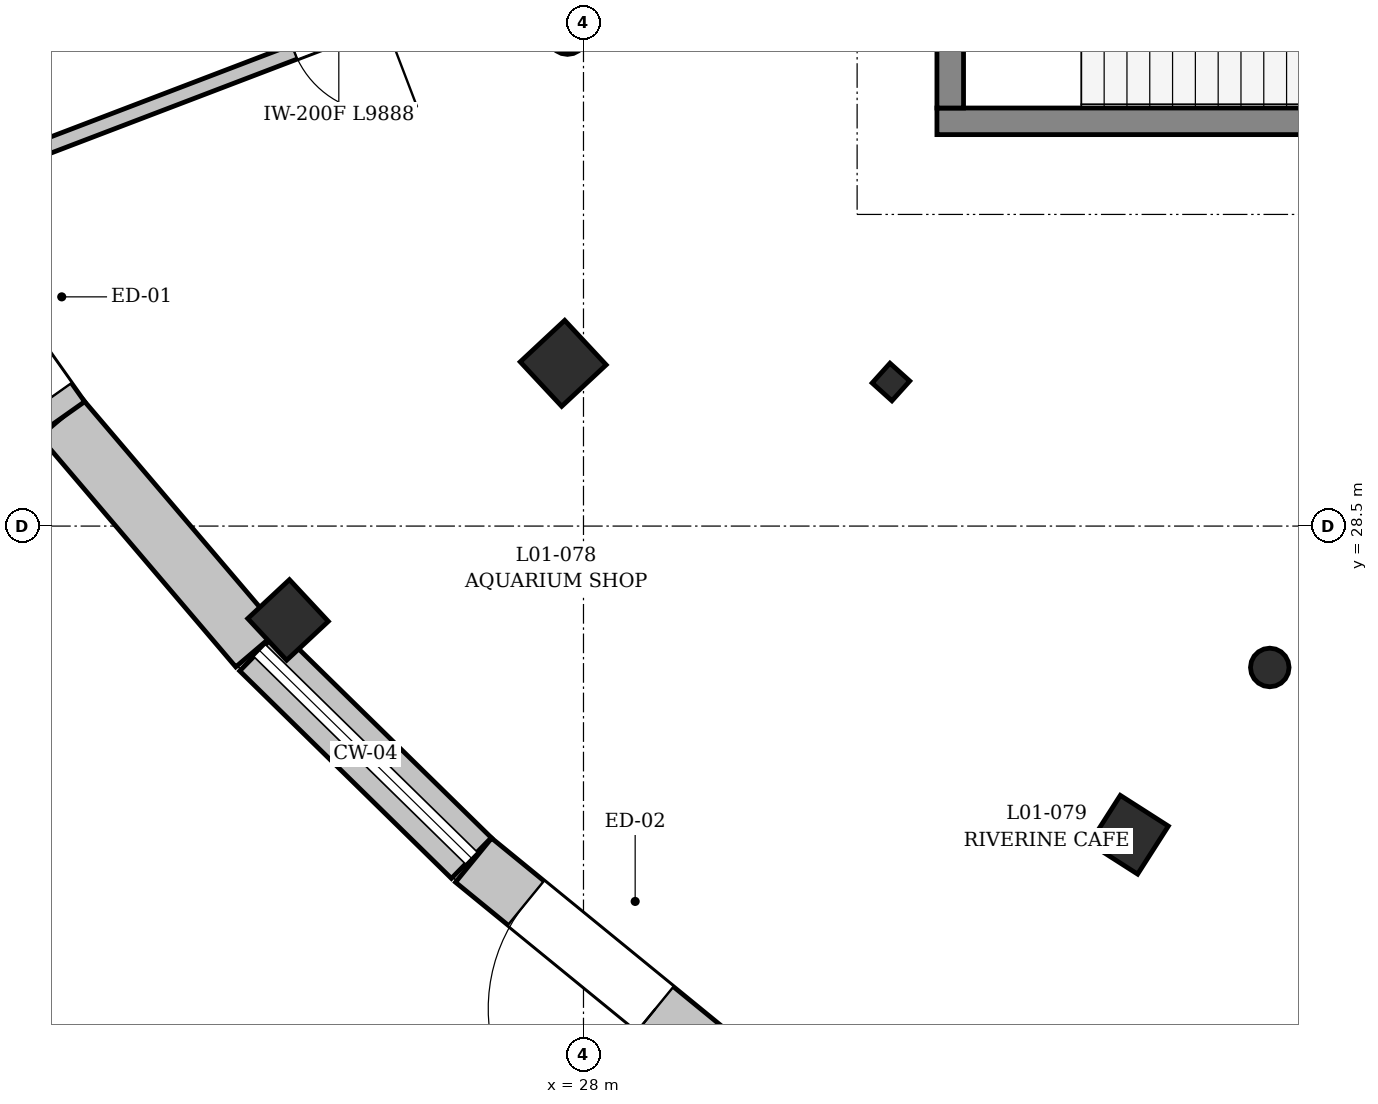
"""IFC4 building model, lengths in metres.
Left out: names, types, materials, properties, quantities, classifications, styles, units other than length and angle.
Written with IfcOpenShell. Run it as: python <this file> out.ifc"""

import sys

from ifc_helpers import new_model, si_unit, direction, frame, frame_2d, origin, origin_2d, place, context, subcontext, project, spatial, rectangle, hollow_rectangle, hollow_circle, extrude, element, fill, save


model = new_model("IFC4")
c1 = context("Model", 3, precision=1e-05, world=origin(), true_north=direction((0.0, 1.0)))
c2 = subcontext(c1, "Body", "Model", "MODEL_VIEW")
j1 = project(units=[si_unit("LENGTHUNIT", "METRE"), si_unit("PLANEANGLEUNIT", "RADIAN")], contexts=[c1])
p1 = place(None, origin())
s1 = spatial("IfcSite", under=j1, at=p1, CompositionType="ELEMENT")
p2 = place(p1, origin())
s2 = spatial("IfcBuilding", under=s1, at=p2, CompositionType="ELEMENT")
p3 = place(p2, origin())
s3 = spatial("IfcBuildingStorey", under=s2, at=p3, CompositionType="ELEMENT", Elevation=0.0)
p4 = place(p3, frame((27.733, 30.641, 0.0), z_axis=(0.0, 0.0, 1.0), x_axis=(-0.731353701619, -0.681998360062, 0.0)))
e1 = element("IfcColumn", 1, at=p4, inside=s3, PredefinedType="COLUMN", context=c2, shape_type="SweptSolid", body=[
    extrude(rectangle(XDim=0.8, YDim=0.8, at=origin_2d()), origin(), (0.0, 0.0, 1.0), 5.12),
])
for number, where, z_axis, x_axis in (
    (2, (24.113, 27.265, 0.0), (0.0, 0.0, 1.0), (-0.731, -0.682, 0.0)),
    (3, (35.177, 24.439, 0.0), (0.0, 0.0, 1.0), (-0.539, -0.842, 0.0)),
):
    element("IfcColumn", number, at=place(p3, frame(where, z_axis=z_axis, x_axis=x_axis)), inside=s3, PredefinedType="COLUMN", context=c2, shape_type="SweptSolid", body=[
        extrude(rectangle(XDim=0.75, YDim=0.75, at=origin_2d()), origin(), (0.0, 0.0, 1.0), 5.12),
    ])
p5 = place(p3, frame((27.789, 34.959, 0.0), z_axis=(0.0, 0.0, 1.0), x_axis=(-0.788010753607, -0.615661475326, 0.0)))
e4 = element("IfcColumn", 4, at=p5, inside=s3, PredefinedType="COLUMN", context=c2, shape_type="SweptSolid", body=[
    extrude(hollow_circle(Radius=0.254, WallThickness=0.02, at=origin_2d()), origin(), (0.0, 0.0, 1.0), 5.14),
])
p6 = place(p3, frame((32.045, 30.396, 0.0), z_axis=(0.0, 0.0, 1.0), x_axis=(-0.669130606359, -0.743144825477, 0.0)))
e5 = element("IfcColumn", 5, at=p6, inside=s3, PredefinedType="COLUMN", context=c2, shape_type="SweptSolid", body=[
    extrude(hollow_rectangle(XDim=0.35, YDim=0.35, WallThickness=0.016, at=origin_2d()), origin(), (0.0, 0.0, 1.0), 5.14),
])
p7 = place(p3, frame((37.029, 26.64, 0.0), z_axis=(0.0, 0.0, 1.0), x_axis=(-0.529919264233, -0.848048096156, 0.0)))
e6 = element("IfcColumn", 6, at=p7, inside=s3, PredefinedType="COLUMN", context=c2, shape_type="SweptSolid", body=[
    extrude(hollow_circle(Radius=0.254, WallThickness=0.02, at=origin_2d()), origin(), (0.0, 0.0, 1.0), 5.14),
])
p8 = place(p3, frame((29.635, 21.586, 0.0), z_axis=(0.0, 0.0, 1.0), x_axis=(-0.77437531836, 0.632726533595, 0.0)))
e7 = element("IfcWall", 7, at=p8, inside=s3, PredefinedType="SOLIDWALL", context=c2, shape_type="SweptSolid", body=[
    extrude(rectangle(XDim=3.98, YDim=0.75, at=frame_2d((1.99, 0.0))), origin(), (0.0, 0.0, 1.0), 5.12),
])
p9 = place(p8, frame((0.89, 0.0, 0.0)))
e8 = element("IfcOpeningElement", 8, at=p9, cuts=e7, PredefinedType="OPENING", context=c2, shape_type="SweptSolid", body=[
    extrude(rectangle(XDim=2.2, YDim=2.6, at=frame_2d((1.1, 1.3))), frame((0.0, 0.385, 0.0), z_axis=(0.0, -1.0, 0.0), x_axis=(1.0, 0.0, 0.0)), (0.0, 0.0, 1.0), 0.77),
])
p10 = place(p3, frame((26.525, 24.133, 4.77), z_axis=(0.0, 0.0, 1.0), x_axis=(-0.714269165584, 0.699871101773, 0.0)))
e9 = element("IfcWall", 9, at=p10, inside=s3, PredefinedType="SOLIDWALL", context=c2, shape_type="SweptSolid", body=[
    extrude(rectangle(XDim=3.9, YDim=0.75, at=frame_2d((1.95, 0.0))), origin(), (0.0, 0.0, 1.0), 0.35),
])
p11 = place(p3, frame((23.711, 26.89, 0.0), z_axis=(0.0, 0.0, 1.0), x_axis=(-0.648317673159, 0.761369945998, 0.0)))
e10 = element("IfcWall", 10, at=p11, inside=s3, PredefinedType="SOLIDWALL", context=c2, shape_type="SweptSolid", body=[
    extrude(rectangle(XDim=3.98, YDim=0.75, at=frame_2d((1.99, 0.0))), origin(), (0.0, 0.0, 1.0), 4.11),
])
p12 = place(p3, frame((21.131, 29.92, 0.0), z_axis=(0.0, 0.0, 1.0), x_axis=(-0.57714553978, 0.816641307988, 0.0)))
e11 = element("IfcWall", 11, at=p12, inside=s3, PredefinedType="SOLIDWALL", context=c2, shape_type="SweptSolid", body=[
    extrude(rectangle(XDim=3.98, YDim=0.75, at=frame_2d((1.99, 0.0))), origin(), (0.0, 0.0, 1.0), 5.12),
])
p13 = place(p12, frame((0.3, 0.0, 0.0)))
e12 = element("IfcOpeningElement", 12, at=p13, cuts=e11, PredefinedType="OPENING", context=c2, shape_type="SweptSolid", body=[
    extrude(rectangle(XDim=2.0, YDim=2.5, at=frame_2d((1.0, 1.25))), frame((0.0, 0.385, 0.0), z_axis=(0.0, -1.0, 0.0), x_axis=(1.0, 0.0, 0.0)), (0.0, 0.0, 1.0), 0.77),
])
p14 = place(p3, frame((32.65, 33.825, 0.0), z_axis=(0.0, 0.0, 1.0), x_axis=(1.0, 0.0, 0.0)))
e13 = element("IfcWall", 13, at=p14, inside=s3, PredefinedType="SHEAR", context=c2, shape_type="SweptSolid", body=[
    extrude(rectangle(XDim=9.1, YDim=0.35, at=frame_2d((4.55, 0.0))), origin(), (0.0, 0.0, 1.0), 5.12),
])
p15 = place(p3, frame((32.825, 37.3, 0.0), z_axis=(0.0, 0.0, 1.0), x_axis=(0.0, -1.0, 0.0)))
e14 = element("IfcWall", 14, at=p15, inside=s3, PredefinedType="SHEAR", context=c2, shape_type="SweptSolid", body=[
    extrude(rectangle(XDim=3.3, YDim=0.35, at=frame_2d((1.65, 0.0))), origin(), (0.0, 0.0, 1.0), 5.12),
])
p16 = place(p15, frame((0.28, 0.0, 0.0)))
e15 = element("IfcOpeningElement", 15, at=p16, cuts=e14, PredefinedType="OPENING", context=c2, shape_type="SweptSolid", body=[
    extrude(rectangle(XDim=1.25, YDim=2.2, at=frame_2d((0.625, 1.1))), frame((0.0, 0.185, 0.0), z_axis=(0.0, -1.0, 0.0), x_axis=(1.0, 0.0, 0.0)), (0.0, 0.0, 1.0), 0.37),
])
p17 = place(p3, frame((29.4, 36.724, 0.0), z_axis=(0.0, 0.0, 1.0), x_axis=(-0.934220330877, -0.356696472334, 0.0)))
e16 = element("IfcWall", 16, at=p17, inside=s3, PredefinedType="PARTITIONING", context=c2, shape_type="SweptSolid", body=[
    extrude(rectangle(XDim=9.888, YDim=0.2, at=frame_2d((4.944, 0.0))), origin(), (0.0, 0.0, 1.0), 4.41),
])
p18 = place(p17, frame((4.319, 0.0, 0.0)))
e17 = element("IfcOpeningElement", 17, at=p18, cuts=e16, PredefinedType="OPENING", context=c2, shape_type="SweptSolid", body=[
    extrude(rectangle(XDim=1.25, YDim=2.2, at=frame_2d((0.625, 1.1))), frame((0.0, 0.11, 0.0), z_axis=(0.0, -1.0, 0.0), x_axis=(1.0, 0.0, 0.0)), (0.0, 0.0, 1.0), 0.22),
])
p19 = place(p9, origin())
e18 = element("IfcDoor", 18, at=p19, inside=s3, OperationType="DOUBLE_DOOR_SINGLE_SWING", PredefinedType="DOOR", context=c2, shape_type="SweptSolid", body=[
    extrude(rectangle(XDim=2.2, YDim=2.6, at=frame_2d((1.1, 1.3))), frame((0.0, 0.025, 0.0), z_axis=(0.0, -1.0, 0.0), x_axis=(1.0, 0.0, 0.0)), (0.0, 0.0, 1.0), 0.05),
])
fill(e8, e18)
p20 = place(p18, origin())
e19 = element("IfcDoor", 19, at=p20, inside=s3, OperationType="SINGLE_SWING_LEFT", PredefinedType="DOOR", context=c2, shape_type="SweptSolid", body=[
    extrude(rectangle(XDim=1.25, YDim=2.2, at=frame_2d((0.625, 1.1))), frame((0.0, 0.025, 0.0), z_axis=(0.0, -1.0, 0.0), x_axis=(1.0, 0.0, 0.0)), (0.0, 0.0, 1.0), 0.05),
])
fill(e17, e19)
save(model, sys.argv[1])
